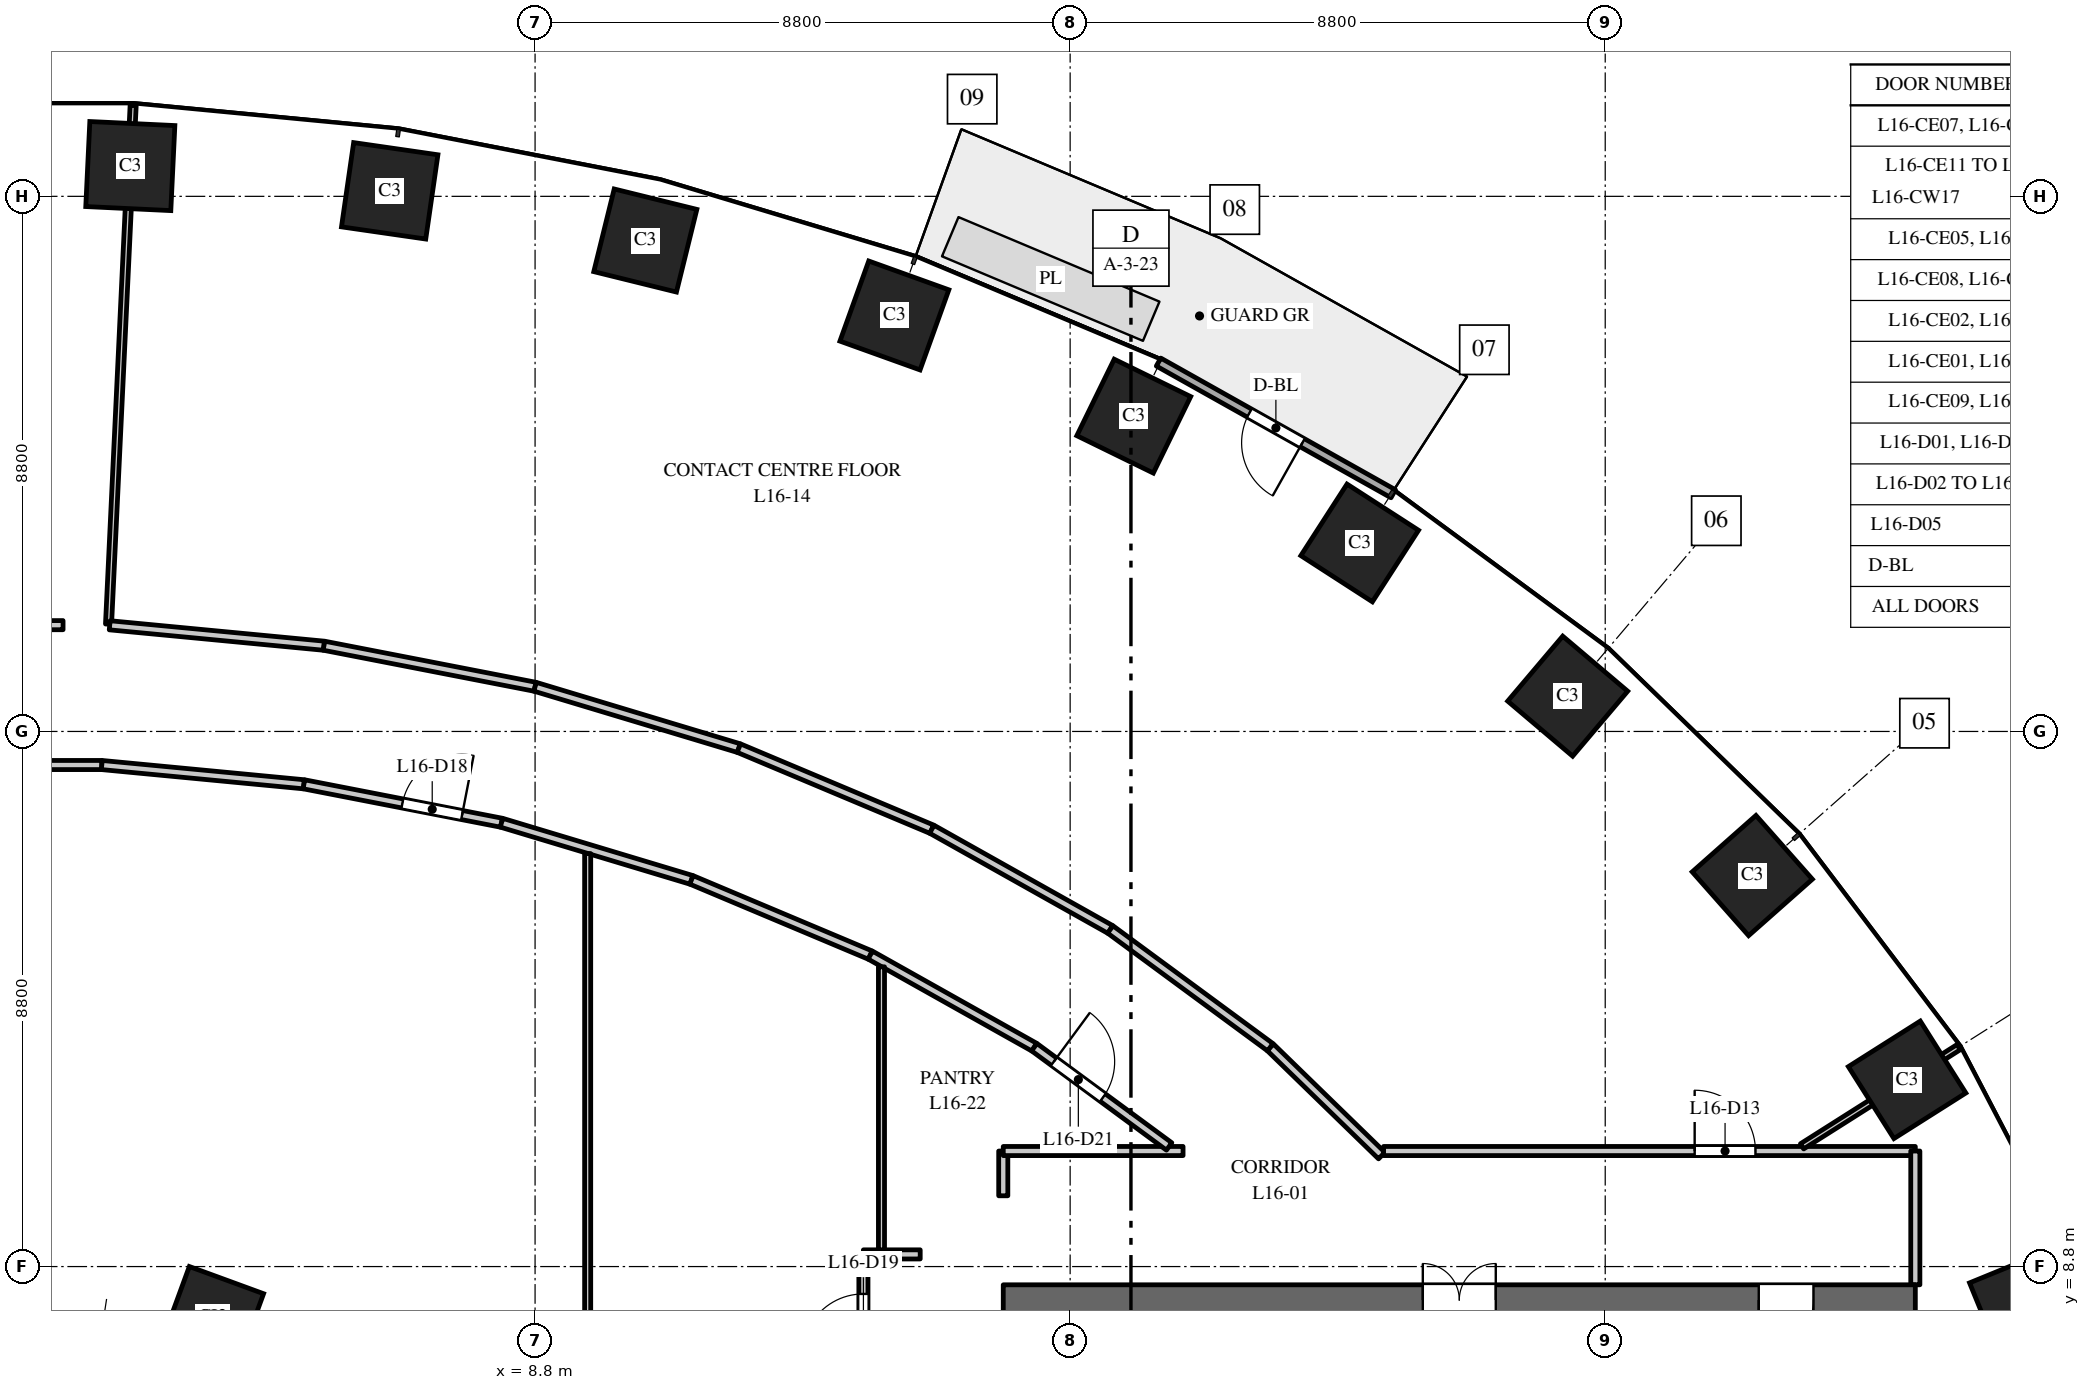
"""IFC4 building model, lengths in metres.
Left out: names, types, materials, properties, quantities, classifications, styles, units other than length and angle.
Written with IfcOpenShell. Run it as: python <this file> out.ifc"""

import sys

from ifc_helpers import new_model, si_unit, direction, frame, frame_2d, origin, origin_2d, place, context, subcontext, project, spatial, rectangle, extrude, element, fill, save


model = new_model("IFC4")
c1 = context("Model", 3, precision=1e-05, world=origin(), true_north=direction((0.0, 1.0)))
c2 = subcontext(c1, "Body", "Model", "MODEL_VIEW")
j1 = project(units=[si_unit("LENGTHUNIT", "METRE"), si_unit("PLANEANGLEUNIT", "RADIAN")], contexts=[c1])
p1 = place(None, origin())
s1 = spatial("IfcSite", under=j1, at=p1, CompositionType="ELEMENT")
p2 = place(p1, origin())
s2 = spatial("IfcBuilding", under=s1, at=p2, CompositionType="ELEMENT")
p3 = place(p2, frame((0.0, 0.0, 74.5)))
s3 = spatial("IfcBuildingStorey", under=s2, at=p3, CompositionType="ELEMENT", Elevation=74.5)
for number, where, z_axis, x_axis in (
    (1, (33.305, 8.149, 0.0), (0.0, 0.0, 1.0), (-0.379, 0.925, 0.0)),
    (2, (31.365, 11.871, 0.0), (0.0, 0.0, 1.0), (-0.535, 0.845, 0.0)),
    (3, (28.819, 15.23, 0.0), (0.0, 0.0, 1.0), (-0.663, 0.749, 0.0)),
    (4, (25.783, 18.18, 0.0), (0.0, 0.0, 1.0), (-0.763, 0.646, 0.0)),
    (5, (22.362, 20.7, 0.0), (0.0, 0.0, 1.0), (-0.84, 0.542, 0.0)),
    (6, (18.646, 22.785, 0.0), (0.0, 0.0, 1.0), (-0.898, 0.439, 0.0)),
    (7, (14.709, 24.441, 0.0), (0.0, 0.0, 1.0), (-0.941, 0.338, 0.0)),
    (8, (10.613, 25.674, 0.0), (0.0, 0.0, 1.0), (-0.971, 0.24, 0.0)),
    (9, (6.409, 26.491, 0.0), (0.0, 0.0, 1.0), (-0.99, 0.143, 0.0)),
    (10, (2.143, 26.898, 0.0), (0.0, 0.0, 1.0), (-0.999, 0.048, 0.0)),
):
    element("IfcColumn", number, at=place(p3, frame(where, z_axis=z_axis, x_axis=x_axis)), inside=s3, PredefinedType="COLUMN", context=c2, shape_type="SweptSolid", body=[
        extrude(rectangle(XDim=1.4, YDim=1.4, at=origin_2d()), origin(), (0.0, 0.0, 1.0), 4.0),
    ])
p4 = place(p3, frame((3.501, 7.967, 0.0), z_axis=(0.0, 0.0, 1.0), x_axis=(-0.939019578916, 0.343863679984, 0.0)))
e11 = element("IfcColumn", 11, at=p4, inside=s3, PredefinedType="COLUMN", context=c2, shape_type="SweptSolid", body=[
    extrude(rectangle(XDim=1.3, YDim=1.3, at=origin_2d()), origin(), (0.0, 0.0, 1.0), 4.0),
])
p5 = place(p3, frame((16.5, 8.25, 0.0), z_axis=(0.0, 0.0, 1.0), x_axis=(1.0, 0.0, 0.0)))
e12 = element("IfcWall", 12, at=p5, inside=s3, PredefinedType="SHEAR", context=c2, shape_type="SweptSolid", body=[
    extrude(rectangle(XDim=15.0, YDim=0.5, at=frame_2d((7.5, 0.0))), origin(), (0.0, 0.0, 1.0), 3.7),
])
p6 = place(p5, frame((6.9, 0.0, 0.0)))
e13 = element("IfcOpeningElement", 13, at=p6, cuts=e12, PredefinedType="OPENING", context=c2, shape_type="SweptSolid", body=[
    extrude(rectangle(XDim=1.2, YDim=2.1, at=frame_2d((0.6, 1.05))), frame((0.0, 0.26, 0.0), z_axis=(0.0, -1.0, 0.0), x_axis=(1.0, 0.0, 0.0)), (0.0, 0.0, 1.0), 0.52),
])
p7 = place(p5, frame((12.425, 0.0, 0.0)))
e14 = element("IfcOpeningElement", 14, at=p7, cuts=e12, PredefinedType="OPENING", context=c2, shape_type="SweptSolid", body=[
    extrude(rectangle(XDim=0.9, YDim=2.1, at=frame_2d((0.45, 1.05))), frame((0.0, 0.26, 0.0), z_axis=(0.0, -1.0, 0.0), x_axis=(1.0, 0.0, 0.0)), (0.0, 0.0, 1.0), 0.52),
])
p8 = place(p3, frame((22.913, 21.509, 0.0), z_axis=(0.0, 0.0, 1.0), x_axis=(-0.872046572975, 0.489422899509, 0.0)))
e15 = element("IfcWall", 15, at=p8, inside=s3, PredefinedType="STANDARD", context=c2, shape_type="SweptSolid", body=[
    extrude(rectangle(XDim=4.426, YDim=0.15, at=frame_2d((2.213, 0.0))), origin(), (0.0, 0.0, 1.0), 3.7),
])
p9 = place(p8, frame((1.713, 0.0, 0.0)))
e16 = element("IfcOpeningElement", 16, at=p9, cuts=e15, PredefinedType="OPENING", context=c2, shape_type="SweptSolid", body=[
    extrude(rectangle(XDim=1.0, YDim=2.4, at=frame_2d((0.5, 1.2))), frame((0.0, 0.085, 0.0), z_axis=(0.0, -1.0, 0.0), x_axis=(1.0, 0.0, 0.0)), (0.0, 0.0, 1.0), 0.17),
])
p10 = place(p3, frame((-1.784, 19.348, 0.0), z_axis=(0.0, 0.0, 1.0), x_axis=(1.0, 0.0, 0.0)))
e17 = element("IfcWall", 17, at=p10, inside=s3, PredefinedType="PARTITIONING", context=c2, shape_type="SweptSolid", body=[
    extrude(rectangle(XDim=2.821, YDim=0.15, at=frame_2d((1.411, 0.0))), origin(), (0.0, 0.0, 1.0), 2.85),
])
p11 = place(p3, frame((0.02, 17.048, 0.0), z_axis=(0.0, 0.0, 1.0), x_axis=(1.0, 0.0, 0.0)))
e18 = element("IfcWall", 18, at=p11, inside=s3, PredefinedType="PARTITIONING", context=c2, shape_type="SweptSolid", body=[
    extrude(rectangle(XDim=1.654, YDim=0.15, at=frame_2d((0.827, 0.0))), origin(), (0.0, 0.0, 1.0), 3.7),
])
p12 = place(p3, frame((1.674, 17.048, 0.0), z_axis=(0.0, 0.0, 1.0), x_axis=(0.995479356205, -0.094978162593, 0.0)))
e19 = element("IfcWall", 19, at=p12, inside=s3, PredefinedType="PARTITIONING", context=c2, shape_type="SweptSolid", body=[
    extrude(rectangle(XDim=3.339, YDim=0.15, at=frame_2d((1.669, 0.0))), origin(), (0.0, 0.0, 1.0), 2.85),
])
p13 = place(p3, frame((1.785, 19.365, 0.0), z_axis=(0.0, 0.0, 1.0), x_axis=(0.04741307074, 0.998875367963, 0.0)))
e20 = element("IfcWall", 20, at=p13, inside=s3, PredefinedType="PARTITIONING", context=c2, shape_type="SweptSolid", body=[
    extrude(rectangle(XDim=8.542, YDim=0.1, at=frame_2d((4.271, 0.0))), origin(), (0.0, 0.0, 1.0), 2.85),
])
p14 = place(p3, frame((1.804, 19.346, 0.0), z_axis=(0.0, 0.0, 1.0), x_axis=(0.99548678928, -0.094900223226, 0.0)))
e21 = element("IfcWall", 21, at=p14, inside=s3, PredefinedType="PARTITIONING", context=c2, shape_type="SweptSolid", body=[
    extrude(rectangle(XDim=3.54, YDim=0.15, at=frame_2d((1.77, 0.0))), origin(), (0.0, 0.0, 1.0), 2.85),
])
p15 = place(p3, frame((4.998, 16.731, 0.0), z_axis=(0.0, 0.0, 1.0), x_axis=(0.981621529558, -0.190838079815, 0.0)))
e22 = element("IfcWall", 22, at=p15, inside=s3, PredefinedType="PARTITIONING", context=c2, shape_type="SweptSolid", body=[
    extrude(rectangle(XDim=3.311, YDim=0.15, at=frame_2d((1.655, 0.0))), origin(), (0.0, 0.0, 1.0), 3.7),
])
p16 = place(p15, frame((1.65, 0.0, 0.0)))
e23 = element("IfcOpeningElement", 23, at=p16, cuts=e22, PredefinedType="OPENING", context=c2, shape_type="SweptSolid", body=[
    extrude(rectangle(XDim=1.0, YDim=2.1, at=frame_2d((0.5, 1.05))), frame((0.0, 0.085, 0.0), z_axis=(0.0, -1.0, 0.0), x_axis=(1.0, 0.0, 0.0)), (0.0, 0.0, 1.0), 0.17),
])
p17 = place(p3, frame((5.328, 19.01, 0.0), z_axis=(0.0, 0.0, 1.0), x_axis=(0.981620418387, -0.190843795306, 0.0)))
e24 = element("IfcWall", 24, at=p17, inside=s3, PredefinedType="PARTITIONING", context=c2, shape_type="SweptSolid", body=[
    extrude(rectangle(XDim=3.537, YDim=0.15, at=frame_2d((1.769, 0.0))), origin(), (0.0, 0.0, 1.0), 3.7),
])
p18 = place(p3, frame((8.248, 16.099, 0.0), z_axis=(0.0, 0.0, 1.0), x_axis=(0.95757464185, -0.28818536619, 0.0)))
e25 = element("IfcWall", 25, at=p18, inside=s3, PredefinedType="PARTITIONING", context=c2, shape_type="SweptSolid", body=[
    extrude(rectangle(XDim=3.262, YDim=0.15, at=frame_2d((1.631, 0.0))), origin(), (0.0, 0.0, 1.0), 2.85),
])
p19 = place(p3, frame((8.8, 18.335, 0.0), z_axis=(0.0, 0.0, 1.0), x_axis=(0.957528149021, -0.288339806186, 0.0)))
e26 = element("IfcWall", 26, at=p19, inside=s3, PredefinedType="PARTITIONING", context=c2, shape_type="SweptSolid", body=[
    extrude(rectangle(XDim=3.5, YDim=0.15, at=frame_2d((1.75, 0.0))), origin(), (0.0, 0.0, 1.0), 2.85),
])
p20 = place(p3, frame((9.665, -15.591, 0.0), z_axis=(0.0, 0.0, 1.0), x_axis=(0.0, 1.0, 0.0)))
e27 = element("IfcWall", 27, at=p20, inside=s3, PredefinedType="PARTITIONING", context=c2, shape_type="SweptSolid", body=[
    extrude(rectangle(XDim=31.182, YDim=0.1, at=frame_2d((15.591, 0.0))), origin(), (0.0, 0.0, 1.0), 2.75),
])
p21 = place(p3, frame((11.372, 15.159, 0.0), z_axis=(0.0, 0.0, 1.0), x_axis=(0.921799502591, -0.387666966638, 0.0)))
e28 = element("IfcWall", 28, at=p21, inside=s3, PredefinedType="PARTITIONING", context=c2, shape_type="SweptSolid", body=[
    extrude(rectangle(XDim=3.19, YDim=0.15, at=frame_2d((1.595, 0.0))), origin(), (0.0, 0.0, 1.0), 3.7),
])
p22 = place(p3, frame((12.151, 17.326, 0.0), z_axis=(0.0, 0.0, 1.0), x_axis=(0.921891448612, -0.387448263612, 0.0)))
e29 = element("IfcWall", 29, at=p22, inside=s3, PredefinedType="PARTITIONING", context=c2, shape_type="SweptSolid", body=[
    extrude(rectangle(XDim=3.443, YDim=0.15, at=frame_2d((1.722, 0.0))), origin(), (0.0, 0.0, 1.0), 3.7),
])
p23 = place(p3, frame((14.2, -9.0, 0.0), z_axis=(0.0, 0.0, 1.0), x_axis=(0.0, 1.0, 0.0)))
e30 = element("IfcWall", 30, at=p23, inside=s3, PredefinedType="PARTITIONING", context=c2, shape_type="SweptSolid", body=[
    extrude(rectangle(XDim=18.0, YDim=0.15, at=frame_2d((9.0, 0.0))), origin(), (0.0, 0.0, 1.0), 2.75),
])
p24 = place(p23, frame((16.35, 0.0, 0.0)))
e31 = element("IfcOpeningElement", 31, at=p24, cuts=e30, PredefinedType="OPENING", context=c2, shape_type="SweptSolid", body=[
    extrude(rectangle(XDim=1.0, YDim=2.1, at=frame_2d((0.5, 1.05))), frame((0.0, 0.085, 0.0), z_axis=(0.0, -1.0, 0.0), x_axis=(1.0, 0.0, 0.0)), (0.0, 0.0, 1.0), 0.17),
])
p25 = place(p3, frame((14.2, 9.0, 0.0), z_axis=(0.0, 0.0, 1.0), x_axis=(1.0, 0.0, 0.0)))
e32 = element("IfcWall", 32, at=p25, inside=s3, PredefinedType="PARTITIONING", context=c2, shape_type="SweptSolid", body=[
    extrude(rectangle(XDim=0.934, YDim=0.15, at=frame_2d((0.467, 0.0))), origin(), (0.0, 0.0, 1.0), 3.7),
])
p26 = place(p3, frame((14.313, 13.922, 0.0), z_axis=(0.0, 0.0, 1.0), x_axis=(0.871977874087, -0.489545286059, 0.0)))
e33 = element("IfcWall", 33, at=p26, inside=s3, PredefinedType="PARTITIONING", context=c2, shape_type="SweptSolid", body=[
    extrude(rectangle(XDim=3.093, YDim=0.15, at=frame_2d((1.546, 0.0))), origin(), (0.0, 0.0, 1.0), 3.7),
])
p27 = place(p3, frame((14.497, 9.075, 0.0), z_axis=(0.0, 0.0, 1.0), x_axis=(0.0, 1.0, 0.0)))
e34 = element("IfcWall", 34, at=p27, inside=s3, PredefinedType="PARTITIONING", context=c2, shape_type="SweptSolid", body=[
    extrude(rectangle(XDim=4.654, YDim=0.1, at=frame_2d((2.327, 0.0))), origin(), (0.0, 0.0, 1.0), 3.7),
])
p28 = place(p3, frame((15.325, 15.992, 0.0), z_axis=(0.0, 0.0, 1.0), x_axis=(0.871958798398, -0.489579262118, 0.0)))
e35 = element("IfcWall", 35, at=p28, inside=s3, PredefinedType="PARTITIONING", context=c2, shape_type="SweptSolid", body=[
    extrude(rectangle(XDim=3.366, YDim=0.15, at=frame_2d((1.683, 0.0))), origin(), (0.0, 0.0, 1.0), 3.7),
])
p29 = place(p3, frame((16.5, 9.964, 0.0), z_axis=(0.0, 0.0, 1.0), x_axis=(0.0, 1.0, 0.0)))
e36 = element("IfcWall", 36, at=p29, inside=s3, PredefinedType="PARTITIONING", context=c2, shape_type="SweptSolid", body=[
    extrude(rectangle(XDim=0.736, YDim=0.15, at=frame_2d((0.368, 0.0))), origin(), (0.0, 0.0, 1.0), 3.7),
])
p30 = place(p3, frame((16.5, 10.7, 0.0), z_axis=(0.0, 0.0, 1.0), x_axis=(1.0, 0.0, 0.0)))
e37 = element("IfcWall", 37, at=p30, inside=s3, PredefinedType="PARTITIONING", context=c2, shape_type="SweptSolid", body=[
    extrude(rectangle(XDim=2.957, YDim=0.15, at=frame_2d((1.479, 0.0))), origin(), (0.0, 0.0, 1.0), 3.7),
])
p31 = place(p3, frame((17.01, 12.408, 0.0), z_axis=(0.0, 0.0, 1.0), x_axis=(0.805276342361, -0.592899664728, 0.0)))
e38 = element("IfcWall", 38, at=p31, inside=s3, PredefinedType="PARTITIONING", context=c2, shape_type="SweptSolid", body=[
    extrude(rectangle(XDim=2.754, YDim=0.15, at=frame_2d((1.377, 0.0))), origin(), (0.0, 0.0, 1.0), 3.7),
])
p32 = place(p31, frame((0.4, 0.0, 0.0)))
e39 = element("IfcOpeningElement", 39, at=p32, cuts=e38, PredefinedType="OPENING", context=c2, shape_type="SweptSolid", body=[
    extrude(rectangle(XDim=1.0, YDim=2.1, at=frame_2d((0.5, 1.05))), frame((0.0, 0.085, 0.0), z_axis=(0.0, -1.0, 0.0), x_axis=(1.0, 0.0, 0.0)), (0.0, 0.0, 1.0), 0.17),
])
p33 = place(p3, frame((18.26, 14.344, 0.0), z_axis=(0.0, 0.0, 1.0), x_axis=(0.805303685339, -0.592862525701, 0.0)))
e40 = element("IfcWall", 40, at=p33, inside=s3, PredefinedType="PARTITIONING", context=c2, shape_type="SweptSolid", body=[
    extrude(rectangle(XDim=3.267, YDim=0.15, at=frame_2d((1.634, 0.0))), origin(), (0.0, 0.0, 1.0), 3.7),
])
p34 = place(p3, frame((20.891, 12.407, 0.0), z_axis=(0.0, 0.0, 1.0), x_axis=(0.71701613235, -0.697056572991, 0.0)))
e41 = element("IfcWall", 41, at=p34, inside=s3, PredefinedType="PARTITIONING", context=c2, shape_type="SweptSolid", body=[
    extrude(rectangle(XDim=2.556, YDim=0.15, at=frame_2d((1.278, 0.0))), origin(), (0.0, 0.0, 1.0), 2.75),
])
p35 = place(p3, frame((22.755, 10.7, 0.0), z_axis=(0.0, 0.0, 1.0), x_axis=(1.0, 0.0, 0.0)))
e42 = element("IfcWall", 42, at=p35, inside=s3, PredefinedType="PARTITIONING", context=c2, shape_type="SweptSolid", body=[
    extrude(rectangle(XDim=8.745, YDim=0.15, at=frame_2d((4.373, 0.0))), origin(), (0.0, 0.0, 1.0), 2.85),
])
p36 = place(p35, frame((5.116, 0.0, 0.0)))
e43 = element("IfcOpeningElement", 43, at=p36, cuts=e42, PredefinedType="OPENING", context=c2, shape_type="SweptSolid", body=[
    extrude(rectangle(XDim=1.0, YDim=2.1, at=frame_2d((0.5, 1.05))), frame((0.0, 0.085, 0.0), z_axis=(0.0, -1.0, 0.0), x_axis=(1.0, 0.0, 0.0)), (0.0, 0.0, 1.0), 0.17),
])
p37 = place(p3, frame((29.637, 10.777, 0.0), z_axis=(0.0, 0.0, 1.0), x_axis=(0.844810627195, 0.535065420467, 0.0)))
e44 = element("IfcWall", 44, at=p37, inside=s3, PredefinedType="PARTITIONING", context=c2, shape_type="SweptSolid", body=[
    extrude(rectangle(XDim=3.048, YDim=0.1, at=frame_2d((1.524, 0.0))), origin(), (0.0, 0.0, 1.0), 2.85),
])
p38 = place(p3, frame((31.5, 8.5, 0.0), z_axis=(0.0, 0.0, 1.0), x_axis=(0.0, 1.0, 0.0)))
e45 = element("IfcWall", 45, at=p38, inside=s3, PredefinedType="PARTITIONING", context=c2, shape_type="SweptSolid", body=[
    extrude(rectangle(XDim=2.2, YDim=0.15, at=frame_2d((1.1, 0.0))), origin(), (0.0, 0.0, 1.0), 2.85),
])
p39 = place(p6, origin())
e46 = element("IfcDoor", 46, at=p39, inside=s3, OperationType="DOUBLE_DOOR_DOUBLE_SWING", PredefinedType="DOOR", context=c2, shape_type="SweptSolid", body=[
    extrude(rectangle(XDim=1.2, YDim=2.1, at=frame_2d((0.6, 1.05))), frame((0.0, 0.025, 0.0), z_axis=(0.0, -1.0, 0.0), x_axis=(1.0, 0.0, 0.0)), (0.0, 0.0, 1.0), 0.05),
])
fill(e13, e46)
p40 = place(p7, origin())
e47 = element("IfcDoor", 47, at=p40, inside=s3, OperationType="SINGLE_SWING_LEFT", PredefinedType="DOOR", context=c2, shape_type="SweptSolid", body=[
    extrude(rectangle(XDim=0.9, YDim=2.1, at=frame_2d((0.45, 1.05))), frame((0.0, 0.025, 0.0), z_axis=(0.0, -1.0, 0.0), x_axis=(1.0, 0.0, 0.0)), (0.0, 0.0, 1.0), 0.05),
])
fill(e14, e47)
p41 = place(p9, origin())
e48 = element("IfcDoor", 48, at=p41, inside=s3, OperationType="SINGLE_SWING_LEFT", PredefinedType="DOOR", context=c2, shape_type="SweptSolid", body=[
    extrude(rectangle(XDim=1.0, YDim=2.4, at=frame_2d((0.5, 1.2))), frame((0.0, 0.025, 0.0), z_axis=(0.0, -1.0, 0.0), x_axis=(1.0, 0.0, 0.0)), (0.0, 0.0, 1.0), 0.05),
])
fill(e16, e48)
p42 = place(p36, origin())
e49 = element("IfcDoor", 49, at=p42, inside=s3, OperationType="SINGLE_SWING_LEFT", PredefinedType="DOOR", context=c2, shape_type="SweptSolid", body=[
    extrude(rectangle(XDim=1.0, YDim=2.1, at=frame_2d((0.5, 1.05))), frame((0.0, 0.025, 0.0), z_axis=(0.0, -1.0, 0.0), x_axis=(1.0, 0.0, 0.0)), (0.0, 0.0, 1.0), 0.05),
])
fill(e43, e49)
p43 = place(p16, origin())
e50 = element("IfcDoor", 50, at=p43, inside=s3, OperationType="SINGLE_SWING_RIGHT", PredefinedType="DOOR", context=c2, shape_type="SweptSolid", body=[
    extrude(rectangle(XDim=1.0, YDim=2.1, at=frame_2d((0.5, 1.05))), frame((0.0, 0.025, 0.0), z_axis=(0.0, -1.0, 0.0), x_axis=(1.0, 0.0, 0.0)), (0.0, 0.0, 1.0), 0.05),
])
fill(e23, e50)
p44 = place(p24, origin())
e51 = element("IfcDoor", 51, at=p44, inside=s3, OperationType="SINGLE_SWING_LEFT", PredefinedType="DOOR", context=c2, shape_type="SweptSolid", body=[
    extrude(rectangle(XDim=1.0, YDim=2.1, at=frame_2d((0.5, 1.05))), frame((0.0, 0.025, 0.0), z_axis=(0.0, -1.0, 0.0), x_axis=(1.0, 0.0, 0.0)), (0.0, 0.0, 1.0), 0.05),
])
fill(e31, e51)
p45 = place(p32, origin())
e52 = element("IfcDoor", 52, at=p45, inside=s3, OperationType="SINGLE_SWING_LEFT", PredefinedType="DOOR", context=c2, shape_type="SweptSolid", body=[
    extrude(rectangle(XDim=1.0, YDim=2.1, at=frame_2d((0.5, 1.05))), frame((0.0, 0.025, 0.0), z_axis=(0.0, -1.0, 0.0), x_axis=(1.0, 0.0, 0.0)), (0.0, 0.0, 1.0), 0.05),
])
fill(e39, e52)
save(model, sys.argv[1])
